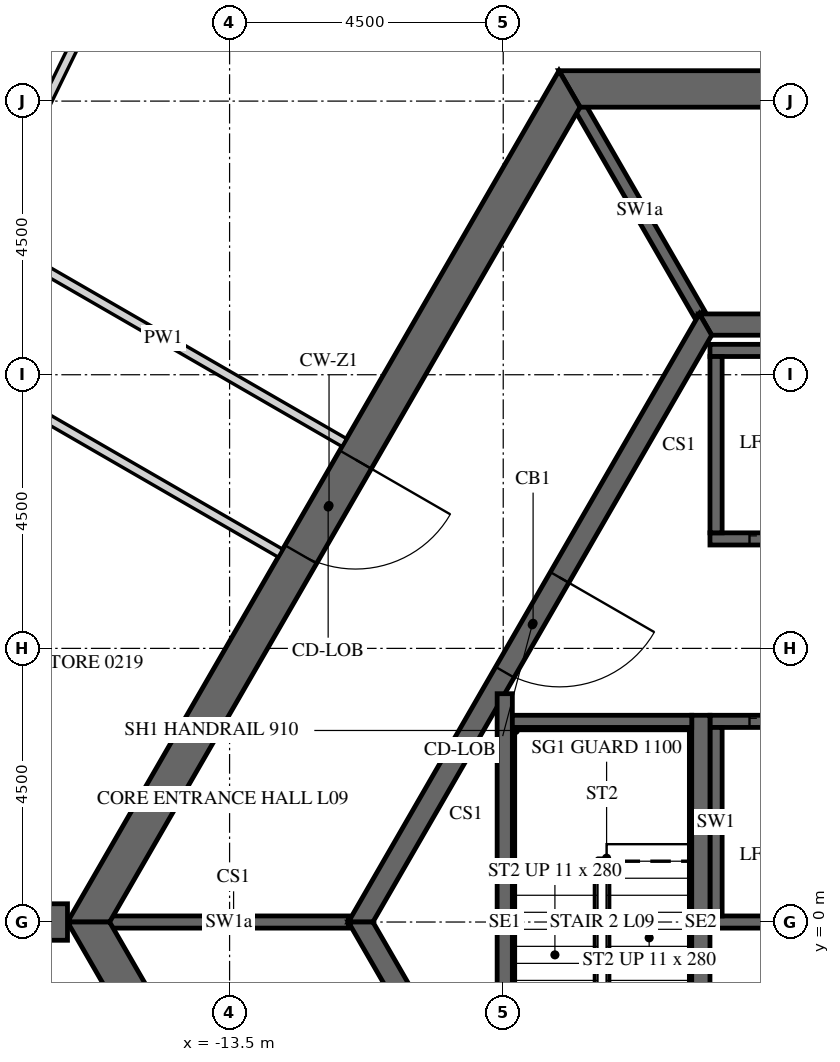
"""IFC4 building model, lengths in metres.
Left out: names, types, materials, properties, quantities, classifications, styles, units other than length and angle.
Written with IfcOpenShell. Run it as: python <this file> out.ifc"""

import sys

from ifc_helpers import new_model, si_unit, direction, frame, frame_2d, origin, place, context, subcontext, project, spatial, polyline, rectangle, outline, extrude, element, fill, save


model = new_model("IFC4")
c1 = context("Model", 3, precision=1e-05, world=origin(), true_north=direction((0.0, 1.0)))
c2 = subcontext(c1, "Body", "Model", "MODEL_VIEW")
j1 = project(units=[si_unit("LENGTHUNIT", "METRE"), si_unit("PLANEANGLEUNIT", "RADIAN")], contexts=[c1])
p1 = place(None, origin())
s1 = spatial("IfcSite", under=j1, at=p1, CompositionType="ELEMENT")
p2 = place(p1, origin())
s2 = spatial("IfcBuilding", under=s1, at=p2, CompositionType="ELEMENT")
p3 = place(p2, frame((0.0, 0.0, 49.2)))
s3 = spatial("IfcBuildingStorey", under=s2, at=p3, CompositionType="ELEMENT", Elevation=49.2)
p4 = place(p3, frame((-7.91, 13.7, -0.15), z_axis=(0.0, 0.0, 1.0), x_axis=(-0.499999880136, -0.866025472988, 0.0)))
e1 = element("IfcWall", 1, at=p4, inside=s3, PredefinedType="SHEAR", context=c2, shape_type="SweptSolid", body=[
    extrude(outline(polyline([(-0.173, -0.3), (15.993, -0.3), (15.646, 0.3), (0.173, 0.3), (-0.173, -0.3)])), origin(), (0.0, 0.0, 1.0), 3.9),
])
p5 = place(p4, frame((7.039, 0.0, 0.15)))
e2 = element("IfcOpeningElement", 2, at=p5, cuts=e1, PredefinedType="OPENING", context=c2, shape_type="SweptSolid", body=[
    extrude(rectangle(XDim=1.8, YDim=2.4, at=frame_2d((0.9, 1.2))), frame((0.0, 0.31, 0.0), z_axis=(0.0, -1.0, 0.0), x_axis=(1.0, 0.0, 0.0)), (0.0, 0.0, 1.0), 0.62),
])
p6 = place(p3, frame((-15.819, 0.0, -0.15), z_axis=(0.0, 0.0, 1.0), x_axis=(0.499999880136, -0.866025472988, 0.0)))
e3 = element("IfcWall", 3, at=p6, inside=s3, PredefinedType="SHEAR", context=c2, shape_type="SweptSolid", body=[
    extrude(outline(polyline([(-0.173, -0.3), (15.993, -0.3), (15.646, 0.3), (0.173, 0.3), (-0.173, -0.3)])), origin(), (0.0, 0.0, 1.0), 3.9),
])
p7 = place(p6, frame((6.981, 0.0, 0.15)))
e4 = element("IfcOpeningElement", 4, at=p7, cuts=e3, PredefinedType="OPENING", context=c2, shape_type="SweptSolid", body=[
    extrude(rectangle(XDim=1.8, YDim=2.4, at=frame_2d((0.9, 1.2))), frame((0.0, 0.31, 0.0), z_axis=(0.0, -1.0, 0.0), x_axis=(1.0, 0.0, 0.0)), (0.0, 0.0, 1.0), 0.62),
])
p8 = place(p3, frame((7.91, 13.7, -0.15), z_axis=(0.0, 0.0, 1.0), x_axis=(-1.0, 0.0, 0.0)))
e5 = element("IfcWall", 5, at=p8, inside=s3, PredefinedType="SHEAR", context=c2, shape_type="SweptSolid", body=[
    extrude(outline(polyline([(-0.173, -0.3), (15.993, -0.3), (15.646, 0.3), (0.173, 0.3), (-0.173, -0.3)])), origin(), (0.0, 0.0, 1.0), 3.9),
])
p9 = place(p8, frame((7.31, 0.0, 0.15)))
e6 = element("IfcOpeningElement", 6, at=p9, cuts=e5, PredefinedType="OPENING", context=c2, shape_type="SweptSolid", body=[
    extrude(rectangle(XDim=1.2, YDim=2.4, at=frame_2d((0.6, 1.2))), frame((0.0, 0.31, 0.0), z_axis=(0.0, -1.0, 0.0), x_axis=(1.0, 0.0, 0.0)), (0.0, 0.0, 1.0), 0.62),
])
p10 = place(p3, frame((-16.166, 0.0, -0.15), z_axis=(0.0, 0.0, 1.0), x_axis=(-1.0, 0.0, 0.0)))
e7 = element("IfcWall", 7, at=p10, inside=s3, PredefinedType="SHEAR", context=c2, shape_type="SweptSolid", body=[
    extrude(rectangle(XDim=16.509, YDim=0.6, at=frame_2d((8.254, 0.0))), origin(), (0.0, 0.0, 1.0), 3.9),
])
p11 = place(p10, frame((7.354, 0.0, 0.15)))
e8 = element("IfcOpeningElement", 8, at=p11, cuts=e7, PredefinedType="OPENING", context=c2, shape_type="SweptSolid", body=[
    extrude(rectangle(XDim=1.8, YDim=2.4, at=frame_2d((0.9, 1.2))), frame((0.0, 0.31, 0.0), z_axis=(0.0, -1.0, 0.0), x_axis=(1.0, 0.0, 0.0)), (0.0, 0.0, 1.0), 0.62),
])
p12 = place(p3, frame((-5.673, 9.825, -0.15), z_axis=(0.0, 0.0, 1.0), x_axis=(-0.499995046907, -0.866028263435, 0.0)))
e9 = element("IfcWall", 9, at=p12, inside=s3, PredefinedType="SHEAR", context=c2, shape_type="SweptSolid", body=[
    extrude(outline(polyline([(-0.101, -0.175), (11.446, -0.175), (11.244, 0.175), (0.101, 0.175), (-0.101, -0.175)])), origin(), (0.0, 0.0, 1.0), 3.9),
])
p13 = place(p12, frame((4.801, 0.0, 0.15)))
e10 = element("IfcOpeningElement", 10, at=p13, cuts=e9, PredefinedType="OPENING", context=c2, shape_type="SweptSolid", body=[
    extrude(rectangle(XDim=1.8, YDim=2.4, at=frame_2d((0.9, 1.2))), frame((0.0, 0.185, 0.0), z_axis=(0.0, -1.0, 0.0), x_axis=(1.0, 0.0, 0.0)), (0.0, 0.0, 1.0), 0.37),
])
p14 = place(p3, frame((-11.345, 0.0, -0.15), z_axis=(0.0, 0.0, 1.0), x_axis=(0.499995046907, -0.866028263435, 0.0)))
e11 = element("IfcWall", 11, at=p14, inside=s3, PredefinedType="SHEAR", context=c2, shape_type="SweptSolid", body=[
    extrude(outline(polyline([(-0.101, -0.175), (11.446, -0.175), (11.244, 0.175), (0.101, 0.175), (-0.101, -0.175)])), origin(), (0.0, 0.0, 1.0), 3.9),
])
p15 = place(p14, frame((4.744, 0.0, 0.15)))
e12 = element("IfcOpeningElement", 12, at=p15, cuts=e11, PredefinedType="OPENING", context=c2, shape_type="SweptSolid", body=[
    extrude(rectangle(XDim=1.8, YDim=2.4, at=frame_2d((0.9, 1.2))), frame((0.0, 0.185, 0.0), z_axis=(0.0, -1.0, 0.0), x_axis=(1.0, 0.0, 0.0)), (0.0, 0.0, 1.0), 0.37),
])
p16 = place(p3, frame((5.673, 9.825, -0.15), z_axis=(0.0, 0.0, 1.0), x_axis=(-1.0, 0.0, 0.0)))
e13 = element("IfcWall", 13, at=p16, inside=s3, PredefinedType="SHEAR", context=c2, shape_type="SweptSolid", body=[
    extrude(outline(polyline([(-0.101, -0.175), (11.446, -0.175), (11.244, 0.175), (0.101, 0.175), (-0.101, -0.175)])), origin(), (0.0, 0.0, 1.0), 3.9),
])
p17 = place(p3, frame((-5.6, 6.3, -0.25), z_axis=(0.0, 0.0, 1.0), x_axis=(1.0, 0.0, 0.0)))
e14 = element("IfcWall", 14, at=p17, inside=s3, PredefinedType="SHEAR", context=c2, shape_type="SweptSolid", body=[
    extrude(rectangle(XDim=11.2, YDim=0.2, at=frame_2d((5.6, 0.0))), origin(), (0.0, 0.0, 1.0), 3.9),
])
p18 = place(p17, frame((0.65, 0.0, 0.25)))
e15 = element("IfcOpeningElement", 15, at=p18, cuts=e14, PredefinedType="OPENING", context=c2, shape_type="SweptSolid", body=[
    extrude(rectangle(XDim=1.1, YDim=2.1, at=frame_2d((0.55, 1.05))), frame((0.0, 0.11, 0.0), z_axis=(0.0, -1.0, 0.0), x_axis=(1.0, 0.0, 0.0)), (0.0, 0.0, 1.0), 0.22),
])
p19 = place(p17, frame((2.85, 0.0, 0.25)))
e16 = element("IfcOpeningElement", 16, at=p19, cuts=e14, PredefinedType="OPENING", context=c2, shape_type="SweptSolid", body=[
    extrude(rectangle(XDim=1.1, YDim=2.1, at=frame_2d((0.55, 1.05))), frame((0.0, 0.11, 0.0), z_axis=(0.0, -1.0, 0.0), x_axis=(1.0, 0.0, 0.0)), (0.0, 0.0, 1.0), 0.22),
])
p20 = place(p17, frame((5.05, 0.0, 0.25)))
e17 = element("IfcOpeningElement", 17, at=p20, cuts=e14, PredefinedType="OPENING", context=c2, shape_type="SweptSolid", body=[
    extrude(rectangle(XDim=1.1, YDim=2.1, at=frame_2d((0.55, 1.05))), frame((0.0, 0.11, 0.0), z_axis=(0.0, -1.0, 0.0), x_axis=(1.0, 0.0, 0.0)), (0.0, 0.0, 1.0), 0.22),
])
p21 = place(p17, frame((7.25, 0.0, 0.25)))
e18 = element("IfcOpeningElement", 18, at=p21, cuts=e14, PredefinedType="OPENING", context=c2, shape_type="SweptSolid", body=[
    extrude(rectangle(XDim=1.1, YDim=2.1, at=frame_2d((0.55, 1.05))), frame((0.0, 0.11, 0.0), z_axis=(0.0, -1.0, 0.0), x_axis=(1.0, 0.0, 0.0)), (0.0, 0.0, 1.0), 0.22),
])
p22 = place(p17, frame((9.45, 0.0, 0.25)))
e19 = element("IfcOpeningElement", 19, at=p22, cuts=e14, PredefinedType="OPENING", context=c2, shape_type="SweptSolid", body=[
    extrude(rectangle(XDim=1.1, YDim=2.1, at=frame_2d((0.55, 1.05))), frame((0.0, 0.11, 0.0), z_axis=(0.0, -1.0, 0.0), x_axis=(1.0, 0.0, 0.0)), (0.0, 0.0, 1.0), 0.22),
])
p23 = place(p3, frame((-5.6, 9.4, -0.25), z_axis=(0.0, 0.0, 1.0), x_axis=(1.0, 0.0, 0.0)))
e20 = element("IfcWall", 20, at=p23, inside=s3, PredefinedType="SHEAR", context=c2, shape_type="SweptSolid", body=[
    extrude(rectangle(XDim=11.2, YDim=0.2, at=frame_2d((5.6, 0.0))), origin(), (0.0, 0.0, 1.0), 3.9),
])
p24 = place(p3, frame((-5.5, 6.4, -0.25), z_axis=(0.0, 0.0, 1.0), x_axis=(0.0, 1.0, 0.0)))
e21 = element("IfcWall", 21, at=p24, inside=s3, PredefinedType="SHEAR", context=c2, shape_type="SweptSolid", body=[
    extrude(rectangle(XDim=2.9, YDim=0.2, at=frame_2d((1.45, 0.0))), origin(), (0.0, 0.0, 1.0), 3.9),
])
p25 = place(p3, frame((-5.6, 3.3, -0.25), z_axis=(0.0, 0.0, 1.0), x_axis=(1.0, 0.0, 0.0)))
e22 = element("IfcWall", 22, at=p25, inside=s3, PredefinedType="SHEAR", context=c2, shape_type="SweptSolid", body=[
    extrude(rectangle(XDim=11.2, YDim=0.2, at=frame_2d((5.6, 0.0))), origin(), (0.0, 0.0, 1.0), 3.9),
])
p26 = place(p25, frame((0.65, 0.0, 0.25)))
e23 = element("IfcOpeningElement", 23, at=p26, cuts=e22, PredefinedType="OPENING", context=c2, shape_type="SweptSolid", body=[
    extrude(rectangle(XDim=1.1, YDim=2.1, at=frame_2d((0.55, 1.05))), frame((0.0, 0.11, 0.0), z_axis=(0.0, -1.0, 0.0), x_axis=(1.0, 0.0, 0.0)), (0.0, 0.0, 1.0), 0.22),
])
p27 = place(p25, frame((2.85, 0.0, 0.25)))
e24 = element("IfcOpeningElement", 24, at=p27, cuts=e22, PredefinedType="OPENING", context=c2, shape_type="SweptSolid", body=[
    extrude(rectangle(XDim=1.1, YDim=2.1, at=frame_2d((0.55, 1.05))), frame((0.0, 0.11, 0.0), z_axis=(0.0, -1.0, 0.0), x_axis=(1.0, 0.0, 0.0)), (0.0, 0.0, 1.0), 0.22),
])
p28 = place(p25, frame((5.05, 0.0, 0.25)))
e25 = element("IfcOpeningElement", 25, at=p28, cuts=e22, PredefinedType="OPENING", context=c2, shape_type="SweptSolid", body=[
    extrude(rectangle(XDim=1.1, YDim=2.1, at=frame_2d((0.55, 1.05))), frame((0.0, 0.11, 0.0), z_axis=(0.0, -1.0, 0.0), x_axis=(1.0, 0.0, 0.0)), (0.0, 0.0, 1.0), 0.22),
])
p29 = place(p25, frame((7.25, 0.0, 0.25)))
e26 = element("IfcOpeningElement", 26, at=p29, cuts=e22, PredefinedType="OPENING", context=c2, shape_type="SweptSolid", body=[
    extrude(rectangle(XDim=1.1, YDim=2.1, at=frame_2d((0.55, 1.05))), frame((0.0, 0.11, 0.0), z_axis=(0.0, -1.0, 0.0), x_axis=(1.0, 0.0, 0.0)), (0.0, 0.0, 1.0), 0.22),
])
p30 = place(p25, frame((9.45, 0.0, 0.25)))
e27 = element("IfcOpeningElement", 27, at=p30, cuts=e22, PredefinedType="OPENING", context=c2, shape_type="SweptSolid", body=[
    extrude(rectangle(XDim=1.1, YDim=2.1, at=frame_2d((0.55, 1.05))), frame((0.0, 0.11, 0.0), z_axis=(0.0, -1.0, 0.0), x_axis=(1.0, 0.0, 0.0)), (0.0, 0.0, 1.0), 0.22),
])
p31 = place(p3, frame((-5.6, 0.0, -0.25), z_axis=(0.0, 0.0, 1.0), x_axis=(1.0, 0.0, 0.0)))
e28 = element("IfcWall", 28, at=p31, inside=s3, PredefinedType="SHEAR", context=c2, shape_type="SweptSolid", body=[
    extrude(rectangle(XDim=11.2, YDim=0.2, at=frame_2d((5.6, 0.0))), origin(), (0.0, 0.0, 1.0), 3.9),
])
p32 = place(p3, frame((-5.5, 0.1, -0.25), z_axis=(0.0, 0.0, 1.0), x_axis=(0.0, 1.0, 0.0)))
e29 = element("IfcWall", 29, at=p32, inside=s3, PredefinedType="SHEAR", context=c2, shape_type="SweptSolid", body=[
    extrude(rectangle(XDim=3.1, YDim=0.2, at=frame_2d((1.55, 0.0))), origin(), (0.0, 0.0, 1.0), 3.9),
])
p33 = place(p3, frame((-5.773, 10.0, -0.15), z_axis=(0.0, 0.0, 1.0), x_axis=(-0.500038251005, 0.86600331843, 0.0)))
e30 = element("IfcWall", 30, at=p33, inside=s3, PredefinedType="SHEAR", context=c2, shape_type="SweptSolid", body=[
    extrude(rectangle(XDim=3.926, YDim=0.2, at=frame_2d((1.963, 0.0))), origin(), (0.0, 0.0, 1.0), 3.9),
])
p34 = place(p3, frame((-11.547, 0.0, -0.15), z_axis=(0.0, 0.0, 1.0), x_axis=(-1.0, 0.0, 0.0)))
e31 = element("IfcWall", 31, at=p34, inside=s3, PredefinedType="SHEAR", context=c2, shape_type="SweptSolid", body=[
    extrude(rectangle(XDim=3.926, YDim=0.2, at=frame_2d((1.963, 0.0))), origin(), (0.0, 0.0, 1.0), 3.9),
])
p35 = place(p3, frame((-5.75, -3.4, -0.25), z_axis=(0.0, 0.0, 1.0), x_axis=(0.0, 1.0, 0.0)))
e32 = element("IfcWall", 32, at=p35, inside=s3, PredefinedType="SHEAR", context=c2, shape_type="SweptSolid", body=[
    extrude(rectangle(XDim=6.8, YDim=0.3, at=frame_2d((3.4, 0.0))), origin(), (0.0, 0.0, 1.0), 3.9),
])
p36 = place(p3, frame((-8.975, -3.755, -0.25), z_axis=(0.0, 0.0, 1.0), x_axis=(0.0, 1.0, 0.0)))
e33 = element("IfcWall", 33, at=p36, inside=s3, PredefinedType="SHEAR", context=c2, shape_type="SweptSolid", body=[
    extrude(rectangle(XDim=7.51, YDim=0.25, at=frame_2d((3.755, 0.0))), origin(), (0.0, 0.0, 1.0), 3.9),
])
p37 = place(p3, frame((-8.85, 3.3, -0.25), z_axis=(0.0, 0.0, 1.0), x_axis=(1.0, 0.0, 0.0)))
e34 = element("IfcWall", 34, at=p37, inside=s3, PredefinedType="SHEAR", context=c2, shape_type="SweptSolid", body=[
    extrude(rectangle(XDim=2.95, YDim=0.2, at=frame_2d((1.475, 0.0))), origin(), (0.0, 0.0, 1.0), 3.9),
])
p38 = place(p3, frame((-14.127, 22.475, 0.0), z_axis=(0.0, 0.0, 1.0), x_axis=(-0.438366981459, -0.898796077855, 0.0)))
e35 = element("IfcWall", 35, at=p38, inside=s3, PredefinedType="PARTITIONING", context=c2, shape_type="SweptSolid", body=[
    extrude(rectangle(XDim=22.586, YDim=0.15, at=frame_2d((11.293, 0.0))), origin(), (0.0, 0.0, 1.0), 2.988),
])
p39 = place(p38, frame((4.656, 0.0, 0.0)))
e36 = element("IfcOpeningElement", 36, at=p39, cuts=e35, PredefinedType="OPENING", context=c2, shape_type="SweptSolid", body=[
    extrude(rectangle(XDim=1.0, YDim=2.1, at=frame_2d((0.5, 1.05))), frame((0.0, 0.085, 0.0), z_axis=(0.0, -1.0, 0.0), x_axis=(1.0, 0.0, 0.0)), (0.0, 0.0, 1.0), 0.17),
])
p40 = place(p38, frame((16.033, 0.0, 0.0)))
e37 = element("IfcOpeningElement", 37, at=p40, cuts=e35, PredefinedType="OPENING", context=c2, shape_type="SweptSolid", body=[
    extrude(rectangle(XDim=1.0, YDim=2.1, at=frame_2d((0.5, 1.05))), frame((0.0, 0.085, 0.0), z_axis=(0.0, -1.0, 0.0), x_axis=(1.0, 0.0, 0.0)), (0.0, 0.0, 1.0), 0.17),
])
p41 = place(p3, frame((-11.614, 7.884, 0.0), z_axis=(0.0, 0.0, 1.0), x_axis=(-0.866026442345, 0.499998201156, 0.0)))
e38 = element("IfcWall", 38, at=p41, inside=s3, PredefinedType="PARTITIONING", context=c2, shape_type="SweptSolid", body=[
    extrude(rectangle(XDim=6.872, YDim=0.15, at=frame_2d((3.436, 0.0))), origin(), (0.0, 0.0, 1.0), 2.988),
])
p42 = place(p3, frame((-17.532, 11.388, 0.0), z_axis=(0.0, 0.0, 1.0), x_axis=(0.438369602246, 0.898794799622, 0.0)))
e39 = element("IfcWall", 39, at=p42, inside=s3, PredefinedType="PARTITIONING", context=c2, shape_type="SweptSolid", body=[
    extrude(rectangle(XDim=10.416, YDim=0.15, at=frame_2d((5.208, 0.0))), origin(), (0.0, 0.0, 1.0), 2.988),
])
p43 = place(p3, frame((-18.423, 9.391, 0.0), z_axis=(0.0, 0.0, 1.0), x_axis=(0.866027239912, -0.49999681972, 0.0)))
e40 = element("IfcWall", 40, at=p43, inside=s3, PredefinedType="PARTITIONING", context=c2, shape_type="SweptSolid", body=[
    extrude(rectangle(XDim=6.65, YDim=0.15, at=frame_2d((3.325, 0.0))), origin(), (0.0, 0.0, 1.0), 2.988),
])
p44 = place(p5, origin())
e41 = element("IfcDoor", 41, at=p44, inside=s3, OperationType="DOUBLE_DOOR_SINGLE_SWING", PredefinedType="DOOR", context=c2, shape_type="SweptSolid", body=[
    extrude(rectangle(XDim=1.8, YDim=2.4, at=frame_2d((0.9, 1.2))), frame((0.0, 0.025, 0.0), z_axis=(0.0, -1.0, 0.0), x_axis=(1.0, 0.0, 0.0)), (0.0, 0.0, 1.0), 0.05),
])
fill(e2, e41)
p45 = place(p13, origin())
e42 = element("IfcDoor", 42, at=p45, inside=s3, OperationType="DOUBLE_DOOR_SINGLE_SWING", PredefinedType="DOOR", context=c2, shape_type="SweptSolid", body=[
    extrude(rectangle(XDim=1.8, YDim=2.4, at=frame_2d((0.9, 1.2))), frame((0.0, 0.025, 0.0), z_axis=(0.0, -1.0, 0.0), x_axis=(1.0, 0.0, 0.0)), (0.0, 0.0, 1.0), 0.05),
])
fill(e10, e42)
p46 = place(p18, origin())
e43 = element("IfcDoor", 43, at=p46, inside=s3, OperationType="SLIDING_TO_LEFT", PredefinedType="DOOR", context=c2, shape_type="SweptSolid", body=[
    extrude(rectangle(XDim=1.1, YDim=2.1, at=frame_2d((0.55, 1.05))), frame((0.0, 0.025, 0.0), z_axis=(0.0, -1.0, 0.0), x_axis=(1.0, 0.0, 0.0)), (0.0, 0.0, 1.0), 0.05),
])
fill(e15, e43)
p47 = place(p26, origin())
e44 = element("IfcDoor", 44, at=p47, inside=s3, OperationType="SLIDING_TO_LEFT", PredefinedType="DOOR", context=c2, shape_type="SweptSolid", body=[
    extrude(rectangle(XDim=1.1, YDim=2.1, at=frame_2d((0.55, 1.05))), frame((0.0, 0.025, 0.0), z_axis=(0.0, -1.0, 0.0), x_axis=(1.0, 0.0, 0.0)), (0.0, 0.0, 1.0), 0.05),
])
fill(e23, e44)
save(model, sys.argv[1])
